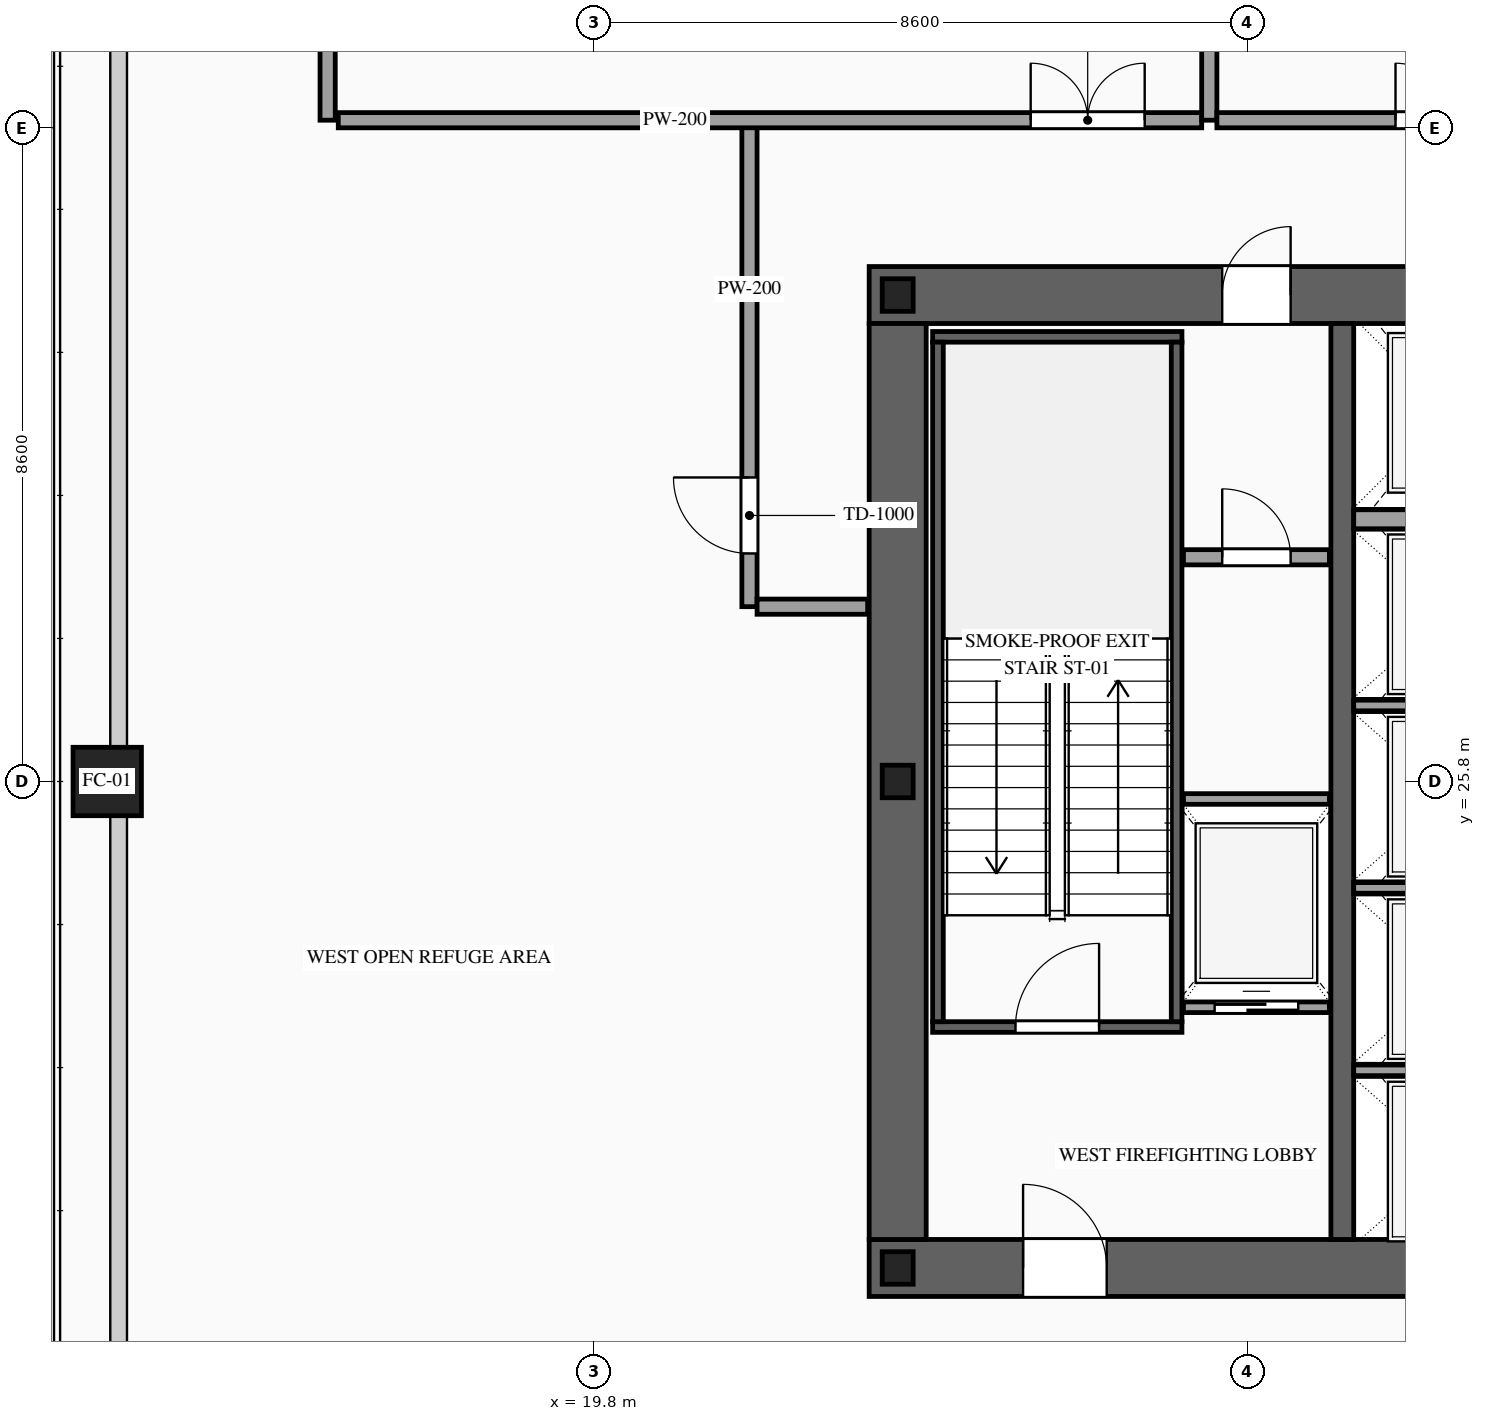
"""IFC4 building model, lengths in metres.
Left out: names, types, materials, properties, quantities, classifications, styles, units other than length and angle.
Written with IfcOpenShell. Run it as: python <this file> out.ifc"""

import sys

from ifc_helpers import new_model, si_unit, direction, frame, frame_2d, origin, origin_2d, place, context, subcontext, project, spatial, rectangle, hollow_rectangle, i_section, extrude, source, transform, mapped, element, fill, save


model = new_model("IFC4")
c1 = context("Model", 3, precision=1e-05, world=origin(), true_north=direction((0.0, 1.0)))
c2 = subcontext(c1, "Body", "Model", "MODEL_VIEW")
j1 = project(units=[si_unit("LENGTHUNIT", "METRE"), si_unit("PLANEANGLEUNIT", "RADIAN")], contexts=[c1])
p1 = place(None, origin())
s1 = spatial("IfcSite", under=j1, at=p1, CompositionType="ELEMENT")
p2 = place(p1, origin())
s2 = spatial("IfcBuilding", under=s1, at=p2, CompositionType="ELEMENT")
p3 = place(p2, frame((0.0, 0.0, 85.6)))
s3 = spatial("IfcBuildingStorey", under=s2, at=p3, CompositionType="ELEMENT", Elevation=85.6)
p4 = place(p3, frame((23.425, 19.4, 0.0), z_axis=(0.0, 0.0, 1.0), x_axis=(1.0, 0.0, 0.0)))
e1 = element("IfcWall", 1, at=p4, inside=s3, PredefinedType="SHEAR", context=c2, shape_type="SweptSolid", body=[
    extrude(rectangle(XDim=27.15, YDim=0.75, at=frame_2d((13.575, 0.0))), origin(), (0.0, 0.0, 1.0), 4.6),
])
p5 = place(p4, frame((2.025, 0.0, 0.0)))
e2 = element("IfcOpeningElement", 2, at=p5, cuts=e1, PredefinedType="OPENING", context=c2, shape_type="SweptSolid", body=[
    extrude(rectangle(XDim=1.1, YDim=2.2, at=frame_2d((0.55, 1.1))), frame((0.0, 0.39, 0.0), z_axis=(0.0, -1.0, 0.0), x_axis=(1.0, 0.0, 0.0)), (0.0, 0.0, 1.0), 0.78),
])
p6 = place(p4, frame((9.925, 0.0, 0.0)))
e3 = element("IfcOpeningElement", 3, at=p6, cuts=e1, PredefinedType="OPENING", context=c2, shape_type="SweptSolid", body=[
    extrude(rectangle(XDim=1.1, YDim=2.2, at=frame_2d((0.55, 1.1))), frame((0.0, 0.39, 0.0), z_axis=(0.0, -1.0, 0.0), x_axis=(1.0, 0.0, 0.0)), (0.0, 0.0, 1.0), 0.78),
])
p7 = place(p4, frame((23.125, 0.0, 0.0)))
e4 = element("IfcOpeningElement", 4, at=p7, cuts=e1, PredefinedType="OPENING", context=c2, shape_type="SweptSolid", body=[
    extrude(rectangle(XDim=1.1, YDim=2.2, at=frame_2d((0.55, 1.1))), frame((0.0, 0.39, 0.0), z_axis=(0.0, -1.0, 0.0), x_axis=(1.0, 0.0, 0.0)), (0.0, 0.0, 1.0), 0.78),
])
p8 = place(p4, frame((19.745, 0.0, 0.0)))
e5 = element("IfcOpeningElement", 5, at=p8, cuts=e1, PredefinedType="OPENING", context=c2, shape_type="SweptSolid", body=[
    extrude(rectangle(XDim=0.9, YDim=2.15, at=frame_2d((0.45, 1.075))), frame((0.0, 0.39, 0.0), z_axis=(0.0, -1.0, 0.0), x_axis=(1.0, 0.0, 0.0)), (0.0, 0.0, 1.0), 0.78),
])
p9 = place(p3, frame((23.425, 32.2, 0.0), z_axis=(0.0, 0.0, 1.0), x_axis=(1.0, 0.0, 0.0)))
e6 = element("IfcWall", 6, at=p9, inside=s3, PredefinedType="SHEAR", context=c2, shape_type="SweptSolid", body=[
    extrude(rectangle(XDim=27.15, YDim=0.75, at=frame_2d((13.575, 0.0))), origin(), (0.0, 0.0, 1.0), 4.6),
])
p10 = place(p9, frame((4.645, 0.0, 0.0)))
e7 = element("IfcOpeningElement", 7, at=p10, cuts=e6, PredefinedType="OPENING", context=c2, shape_type="SweptSolid", body=[
    extrude(rectangle(XDim=0.9, YDim=2.15, at=frame_2d((0.45, 1.075))), frame((0.0, 0.39, 0.0), z_axis=(0.0, -1.0, 0.0), x_axis=(1.0, 0.0, 0.0)), (0.0, 0.0, 1.0), 0.78),
])
p11 = place(p9, frame((9.925, 0.0, 0.0)))
e8 = element("IfcOpeningElement", 8, at=p11, cuts=e6, PredefinedType="OPENING", context=c2, shape_type="SweptSolid", body=[
    extrude(rectangle(XDim=1.1, YDim=2.2, at=frame_2d((0.55, 1.1))), frame((0.0, 0.39, 0.0), z_axis=(0.0, -1.0, 0.0), x_axis=(1.0, 0.0, 0.0)), (0.0, 0.0, 1.0), 0.78),
])
p12 = place(p9, frame((15.775, 0.0, 0.0)))
e9 = element("IfcOpeningElement", 9, at=p12, cuts=e6, PredefinedType="OPENING", context=c2, shape_type="SweptSolid", body=[
    extrude(rectangle(XDim=1.1, YDim=2.2, at=frame_2d((0.55, 1.1))), frame((0.0, 0.39, 0.0), z_axis=(0.0, -1.0, 0.0), x_axis=(1.0, 0.0, 0.0)), (0.0, 0.0, 1.0), 0.78),
])
p13 = place(p9, frame((18.975, 0.0, 0.0)))
e10 = element("IfcOpeningElement", 10, at=p13, cuts=e6, PredefinedType="OPENING", context=c2, shape_type="SweptSolid", body=[
    extrude(rectangle(XDim=0.9, YDim=2.15, at=frame_2d((0.45, 1.075))), frame((0.0, 0.39, 0.0), z_axis=(0.0, -1.0, 0.0), x_axis=(1.0, 0.0, 0.0)), (0.0, 0.0, 1.0), 0.78),
])
m1 = source(origin(), c2, "Body", "SweptSolid", [
    extrude(rectangle(XDim=12.05, YDim=0.75, at=frame_2d((6.025, 0.0))), origin(), (0.0, 0.0, 1.0), 4.6),
])
p14 = place(p3, frame((23.8, 19.775, 0.0), z_axis=(0.0, 0.0, 1.0), x_axis=(0.0, 1.0, 0.0)))
e11 = element("IfcWall", 11, at=p14, inside=s3, PredefinedType="SHEAR", context=c2, shape_type="MappedRepresentation", body=[
    mapped(m1, transform((0.0, 0.0, 0.0), scale=1.0)),
])
m2 = source(origin(), c2, "Body", "SweptSolid", [
    extrude(rectangle(XDim=12.05, YDim=0.3, at=frame_2d((6.025, 0.0))), origin(), (0.0, 0.0, 1.0), 4.6),
])
p15 = place(p3, frame((29.65, 19.775, 0.0), z_axis=(0.0, 0.0, 1.0), x_axis=(0.0, 1.0, 0.0)))
e12 = element("IfcWall", 12, at=p15, inside=s3, PredefinedType="SOLIDWALL", context=c2, shape_type="MappedRepresentation", body=[
    mapped(m2, transform((0.0, 0.0, 0.0), scale=1.0)),
])
m3 = source(origin(), c2, "Body", "SweptSolid", [
    extrude(i_section(OverallWidth=0.407, OverallDepth=0.428, WebThickness=0.02, FlangeThickness=0.035, at=origin_2d()), origin(), (0.0, 0.0, 1.0), 4.6),
])
for number, where, z_axis, x_axis in (
    (13, (23.8, 19.4, 0.0), (0.0, 0.0, 1.0), (1.0, 0.0, 0.0)),
    (14, (23.8, 25.8, 0.0), (0.0, 0.0, 1.0), (1.0, 0.0, 0.0)),
    (15, (23.8, 32.2, 0.0), (0.0, 0.0, 1.0), (1.0, 0.0, 0.0)),
):
    element("IfcColumn", number, at=place(p3, frame(where, z_axis=z_axis, x_axis=x_axis)), inside=s3, PredefinedType="COLUMN", context=c2, shape_type="MappedRepresentation", body=[
        mapped(m3, transform((0.0, 0.0, 0.0), scale=1.0)),
    ])
m4 = source(origin(), c2, "Body", "SweptSolid", [
    extrude(hollow_rectangle(XDim=0.9, YDim=0.9, WallThickness=0.042, at=origin_2d()), origin(), (0.0, 0.0, 1.0), 4.6),
])
p16 = place(p3, frame((13.4, 25.8, 0.0), z_axis=(0.0, 0.0, 1.0), x_axis=(1.0, 0.0, 0.0)))
e16 = element("IfcColumn", 16, at=p16, inside=s3, PredefinedType="COLUMN", context=c2, shape_type="MappedRepresentation", body=[
    mapped(m4, transform((0.0, 0.0, 0.0), scale=1.0)),
])
p17 = place(p3, frame((27.56, 22.83, 0.0), z_axis=(0.0, 0.0, 1.0), x_axis=(1.0, 0.0, 0.0)))
e17 = element("IfcWall", 17, at=p17, inside=s3, PredefinedType="SOLIDWALL", context=c2, shape_type="SweptSolid", body=[
    extrude(rectangle(XDim=1.92, YDim=0.14, at=frame_2d((0.96, 0.0))), origin(), (0.0, 0.0, 1.0), 4.38),
])
p18 = place(p17, frame((0.41, 0.0, 0.0)))
e18 = element("IfcOpeningElement", 18, at=p18, cuts=e17, PredefinedType="OPENING", context=c2, shape_type="SweptSolid", body=[
    extrude(rectangle(XDim=1.1, YDim=2.2, at=frame_2d((0.55, 1.1))), frame((0.0, 0.085, 0.0), z_axis=(0.0, -1.0, 0.0), x_axis=(1.0, 0.0, 0.0)), (0.0, 0.0, 1.0), 0.17),
])
m5 = source(origin(), c2, "Body", "SweptSolid", [
    extrude(rectangle(XDim=1.92, YDim=0.14, at=frame_2d((0.96, 0.0))), origin(), (0.0, 0.0, 1.0), 4.38),
])
p19 = place(p3, frame((27.56, 25.57, 0.0), z_axis=(0.0, 0.0, 1.0), x_axis=(1.0, 0.0, 0.0)))
e19 = element("IfcWall", 19, at=p19, inside=s3, PredefinedType="SOLIDWALL", context=c2, shape_type="MappedRepresentation", body=[
    mapped(m5, transform((0.0, 0.0, 0.0), scale=1.0)),
])
m6 = source(origin(), c2, "Body", "SweptSolid", [
    extrude(rectangle(XDim=2.5, YDim=0.14, at=frame_2d((1.25, 0.0))), origin(), (0.0, 0.0, 1.0), 4.38),
])
for number, where, z_axis, x_axis in (
    (20, (29.8, 22.0, 0.0), (0.0, 0.0, 1.0), (1.0, 0.0, 0.0)),
    (21, (29.8, 24.4, 0.0), (0.0, 0.0, 1.0), (1.0, 0.0, 0.0)),
    (22, (29.8, 26.8, 0.0), (0.0, 0.0, 1.0), (1.0, 0.0, 0.0)),
):
    element("IfcWall", number, at=place(p3, frame(where, z_axis=z_axis, x_axis=x_axis)), inside=s3, PredefinedType="SOLIDWALL", context=c2, shape_type="MappedRepresentation", body=[
        mapped(m6, transform((0.0, 0.0, 0.0), scale=1.0)),
    ])
m7 = source(origin(), c2, "Body", "SweptSolid", [
    extrude(rectangle(XDim=2.5, YDim=0.25, at=frame_2d((1.25, 0.0))), origin(), (0.0, 0.0, 1.0), 4.38),
])
p20 = place(p3, frame((29.8, 29.25, 0.0), z_axis=(0.0, 0.0, 1.0), x_axis=(1.0, 0.0, 0.0)))
e23 = element("IfcWall", 23, at=p20, inside=s3, PredefinedType="SOLIDWALL", context=c2, shape_type="MappedRepresentation", body=[
    mapped(m7, transform((0.0, 0.0, 0.0), scale=1.0)),
])
p21 = place(p3, frame((24.26, 22.57, 0.0), z_axis=(0.0, 0.0, 1.0), x_axis=(1.0, 0.0, 0.0)))
e24 = element("IfcWall", 24, at=p21, inside=s3, PredefinedType="SOLIDWALL", context=c2, shape_type="SweptSolid", body=[
    extrude(rectangle(XDim=3.28, YDim=0.14, at=frame_2d((1.64, 0.0))), origin(), (0.0, 0.0, 1.0), 4.38),
])
p22 = place(p21, frame((1.09, 0.0, 0.0)))
e25 = element("IfcOpeningElement", 25, at=p22, cuts=e24, PredefinedType="OPENING", context=c2, shape_type="SweptSolid", body=[
    extrude(rectangle(XDim=1.1, YDim=2.2, at=frame_2d((0.55, 1.1))), frame((0.0, 0.085, 0.0), z_axis=(0.0, -1.0, 0.0), x_axis=(1.0, 0.0, 0.0)), (0.0, 0.0, 1.0), 0.17),
])
m8 = source(origin(), c2, "Body", "SweptSolid", [
    extrude(rectangle(XDim=3.28, YDim=0.14, at=frame_2d((1.64, 0.0))), origin(), (0.0, 0.0, 1.0), 4.38),
])
p23 = place(p3, frame((24.26, 31.65, 0.0), z_axis=(0.0, 0.0, 1.0), x_axis=(1.0, 0.0, 0.0)))
e26 = element("IfcWall", 26, at=p23, inside=s3, PredefinedType="SOLIDWALL", context=c2, shape_type="MappedRepresentation", body=[
    mapped(m8, transform((0.0, 0.0, 0.0), scale=1.0)),
])
m9 = source(origin(), c2, "Body", "SweptSolid", [
    extrude(rectangle(XDim=8.94, YDim=0.14, at=frame_2d((4.47, 0.0))), origin(), (0.0, 0.0, 1.0), 4.38),
])
for number, where, z_axis, x_axis in (
    (27, (24.33, 22.64, 0.0), (0.0, 0.0, 1.0), (0.0, 1.0, 0.0)),
    (28, (27.47, 22.64, 0.0), (0.0, 0.0, 1.0), (0.0, 1.0, 0.0)),
):
    element("IfcWall", number, at=place(p3, frame(where, z_axis=z_axis, x_axis=x_axis)), inside=s3, PredefinedType="SOLIDWALL", context=c2, shape_type="MappedRepresentation", body=[
        mapped(m9, transform((0.0, 0.0, 0.0), scale=1.0)),
    ])
p24 = place(p3, frame((27.56, 28.75, 0.0), z_axis=(0.0, 0.0, 1.0), x_axis=(1.0, 0.0, 0.0)))
e29 = element("IfcWall", 29, at=p24, inside=s3, PredefinedType="PARTITIONING", context=c2, shape_type="SweptSolid", body=[
    extrude(rectangle(XDim=1.92, YDim=0.2, at=frame_2d((0.96, 0.0))), origin(), (0.0, 0.0, 1.0), 4.38),
])
p25 = place(p24, frame((0.51, 0.0, 0.0)))
e30 = element("IfcOpeningElement", 30, at=p25, cuts=e29, PredefinedType="OPENING", context=c2, shape_type="SweptSolid", body=[
    extrude(rectangle(XDim=0.9, YDim=2.15, at=frame_2d((0.45, 1.075))), frame((0.0, 0.115, 0.0), z_axis=(0.0, -1.0, 0.0), x_axis=(1.0, 0.0, 0.0)), (0.0, 0.0, 1.0), 0.23),
])
m10 = source(origin(), c2, "Body", "SweptSolid", [
    extrude(rectangle(XDim=14.6, YDim=0.2, at=frame_2d((7.3, 0.0))), origin(), (0.0, 0.0, 1.0), 4.38),
])
p26 = place(p3, frame((16.3, 34.5, 0.0), z_axis=(0.0, 0.0, 1.0), x_axis=(0.0, 1.0, 0.0)))
e31 = element("IfcWall", 31, at=p26, inside=s3, PredefinedType="PARTITIONING", context=c2, shape_type="MappedRepresentation", body=[
    mapped(m10, transform((0.0, 0.0, 0.0), scale=1.0)),
])
p27 = place(p3, frame((21.85, 28.1, 0.0), z_axis=(0.0, 0.0, 1.0), x_axis=(0.0, 1.0, 0.0)))
e32 = element("IfcWall", 32, at=p27, inside=s3, PredefinedType="PARTITIONING", context=c2, shape_type="SweptSolid", body=[
    extrude(rectangle(XDim=6.4, YDim=0.2, at=frame_2d((3.2, 0.0))), origin(), (0.0, 0.0, 1.0), 4.38),
])
p28 = place(p27, frame((0.7, 0.0, 0.0)))
e33 = element("IfcOpeningElement", 33, at=p28, cuts=e32, PredefinedType="OPENING", context=c2, shape_type="SweptSolid", body=[
    extrude(rectangle(XDim=1.0, YDim=2.2, at=frame_2d((0.5, 1.1))), frame((0.0, 0.115, 0.0), z_axis=(0.0, -1.0, 0.0), x_axis=(1.0, 0.0, 0.0)), (0.0, 0.0, 1.0), 0.23),
])
m11 = source(origin(), c2, "Body", "SweptSolid", [
    extrude(rectangle(XDim=1.455, YDim=0.2, at=frame_2d((0.728, 0.0))), origin(), (0.0, 0.0, 1.0), 4.38),
])
p29 = place(p3, frame((21.95, 28.1, 0.0), z_axis=(0.0, 0.0, 1.0), x_axis=(1.0, 0.0, 0.0)))
e34 = element("IfcWall", 34, at=p29, inside=s3, PredefinedType="PARTITIONING", context=c2, shape_type="MappedRepresentation", body=[
    mapped(m11, transform((0.0, 0.0, 0.0), scale=1.0)),
])
p30 = place(p3, frame((16.44, 34.5, 0.0), z_axis=(0.0, 0.0, 1.0), x_axis=(1.0, 0.0, 0.0)))
e35 = element("IfcWall", 35, at=p30, inside=s3, PredefinedType="PARTITIONING", context=c2, shape_type="SweptSolid", body=[
    extrude(rectangle(XDim=11.36, YDim=0.2, at=frame_2d((5.68, 0.0))), origin(), (0.0, 0.0, 1.0), 4.38),
])
p31 = place(p30, frame((9.11, 0.0, 0.0)))
e36 = element("IfcOpeningElement", 36, at=p31, cuts=e35, PredefinedType="OPENING", context=c2, shape_type="SweptSolid", body=[
    extrude(rectangle(XDim=1.5, YDim=2.3, at=frame_2d((0.75, 1.15))), frame((0.0, 0.115, 0.0), z_axis=(0.0, -1.0, 0.0), x_axis=(1.0, 0.0, 0.0)), (0.0, 0.0, 1.0), 0.23),
])
p32 = place(p3, frame((27.9, 34.5, 0.0), z_axis=(0.0, 0.0, 1.0), x_axis=(0.0, 1.0, 0.0)))
e37 = element("IfcWall", 37, at=p32, inside=s3, PredefinedType="PARTITIONING", context=c2, shape_type="MappedRepresentation", body=[
    mapped(m10, transform((0.0, 0.0, 0.0), scale=1.0)),
])
p33 = place(p3, frame((28.0, 34.5, 0.0), z_axis=(0.0, 0.0, 1.0), x_axis=(1.0, 0.0, 0.0)))
e38 = element("IfcWall", 38, at=p33, inside=s3, PredefinedType="PARTITIONING", context=c2, shape_type="SweptSolid", body=[
    extrude(rectangle(XDim=6.2, YDim=0.2, at=frame_2d((3.1, 0.0))), origin(), (0.0, 0.0, 1.0), 4.38),
])
p34 = place(p33, frame((2.35, 0.0, 0.0)))
e39 = element("IfcOpeningElement", 39, at=p34, cuts=e38, PredefinedType="OPENING", context=c2, shape_type="SweptSolid", body=[
    extrude(rectangle(XDim=1.5, YDim=2.3, at=frame_2d((0.75, 1.15))), frame((0.0, 0.115, 0.0), z_axis=(0.0, -1.0, 0.0), x_axis=(1.0, 0.0, 0.0)), (0.0, 0.0, 1.0), 0.23),
])
m12 = source(origin(), c2, "Body", "SweptSolid", [
    extrude(rectangle(XDim=1.1, YDim=2.2, at=frame_2d((0.55, 1.1))), frame((0.0, 0.025, 0.0), z_axis=(0.0, -1.0, 0.0), x_axis=(1.0, 0.0, 0.0)), (0.0, 0.0, 1.0), 0.05),
])
p35 = place(p18, origin())
e40 = element("IfcDoor", 40, at=p35, inside=s3, OperationType="SLIDING_TO_LEFT", PredefinedType="DOOR", context=c2, shape_type="MappedRepresentation", body=[
    mapped(m12, transform((0.0, 0.0, 0.0), scale=1.0)),
])
fill(e18, e40)
m13 = source(origin(), c2, "Body", "SweptSolid", [
    extrude(rectangle(XDim=1.1, YDim=2.2, at=frame_2d((0.55, 1.1))), frame((0.0, 0.025, 0.0), z_axis=(0.0, -1.0, 0.0), x_axis=(1.0, 0.0, 0.0)), (0.0, 0.0, 1.0), 0.05),
])
p36 = place(p22, origin())
e41 = element("IfcDoor", 41, at=p36, inside=s3, OperationType="SINGLE_SWING_RIGHT", PredefinedType="DOOR", context=c2, shape_type="MappedRepresentation", body=[
    mapped(m13, transform((0.0, 0.0, 0.0), scale=1.0)),
])
fill(e25, e41)
p37 = place(p5, origin())
e42 = element("IfcDoor", 42, at=p37, inside=s3, OperationType="SINGLE_SWING_LEFT", PredefinedType="DOOR", context=c2, shape_type="MappedRepresentation", body=[
    mapped(m13, transform((0.0, 0.0, 0.0), scale=1.0)),
])
fill(e2, e42)
m14 = source(origin(), c2, "Body", "SweptSolid", [
    extrude(rectangle(XDim=0.9, YDim=2.15, at=frame_2d((0.45, 1.075))), frame((0.0, 0.025, 0.0), z_axis=(0.0, -1.0, 0.0), x_axis=(1.0, 0.0, 0.0)), (0.0, 0.0, 1.0), 0.05),
])
p38 = place(p10, origin())
e43 = element("IfcDoor", 43, at=p38, inside=s3, OperationType="SINGLE_SWING_RIGHT", PredefinedType="DOOR", context=c2, shape_type="MappedRepresentation", body=[
    mapped(m14, transform((0.0, 0.0, 0.0), scale=1.0)),
])
fill(e7, e43)
p39 = place(p25, origin())
e44 = element("IfcDoor", 44, at=p39, inside=s3, OperationType="SINGLE_SWING_LEFT", PredefinedType="DOOR", context=c2, shape_type="MappedRepresentation", body=[
    mapped(m14, transform((0.0, 0.0, 0.0), scale=1.0)),
])
fill(e30, e44)
m15 = source(origin(), c2, "Body", "SweptSolid", [
    extrude(rectangle(XDim=1.0, YDim=2.2, at=frame_2d((0.5, 1.1))), frame((0.0, 0.025, 0.0), z_axis=(0.0, -1.0, 0.0), x_axis=(1.0, 0.0, 0.0)), (0.0, 0.0, 1.0), 0.05),
])
p40 = place(p28, origin())
e45 = element("IfcDoor", 45, at=p40, inside=s3, OperationType="SINGLE_SWING_RIGHT", PredefinedType="DOOR", context=c2, shape_type="MappedRepresentation", body=[
    mapped(m15, transform((0.0, 0.0, 0.0), scale=1.0)),
])
fill(e33, e45)
m16 = source(origin(), c2, "Body", "SweptSolid", [
    extrude(rectangle(XDim=1.5, YDim=2.3, at=frame_2d((0.75, 1.15))), frame((0.0, 0.025, 0.0), z_axis=(0.0, -1.0, 0.0), x_axis=(1.0, 0.0, 0.0)), (0.0, 0.0, 1.0), 0.05),
])
p41 = place(p31, origin())
e46 = element("IfcDoor", 46, at=p41, inside=s3, OperationType="DOUBLE_DOOR_SINGLE_SWING", PredefinedType="DOOR", context=c2, shape_type="MappedRepresentation", body=[
    mapped(m16, transform((0.0, 0.0, 0.0), scale=1.0)),
])
fill(e36, e46)
p42 = place(p34, origin())
e47 = element("IfcDoor", 47, at=p42, inside=s3, OperationType="DOUBLE_DOOR_SINGLE_SWING", PredefinedType="DOOR", context=c2, shape_type="MappedRepresentation", body=[
    mapped(m16, transform((0.0, 0.0, 0.0), scale=1.0)),
])
fill(e39, e47)
save(model, sys.argv[1])
